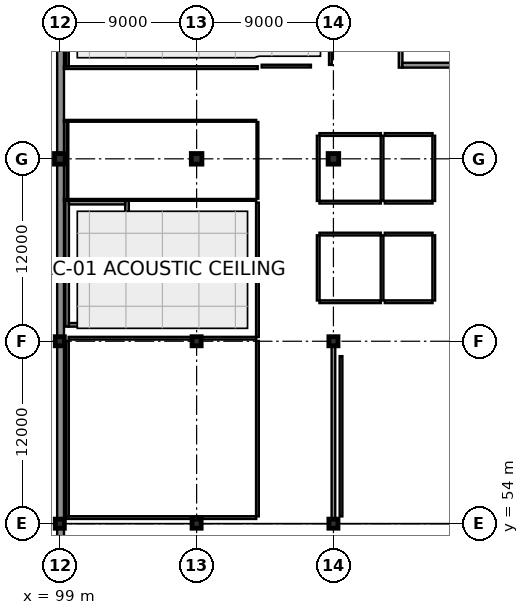
"""IFC4 building model, lengths in metres.
Left out: names, types, materials, properties, quantities, classifications, styles, units other than length and angle.
Written with IfcOpenShell. Run it as: python <this file> out.ifc"""

import sys

from ifc_helpers import new_model, si_unit, direction, frame, frame_2d, origin, origin_2d, place, context, subcontext, project, spatial, rectangle, extrude, element, fill, save


model = new_model("IFC4")
c1 = context("Model", 3, precision=1e-05, world=origin(), true_north=direction((0.0, 1.0)))
c2 = subcontext(c1, "Body", "Model", "MODEL_VIEW")
j1 = project(units=[si_unit("LENGTHUNIT", "METRE"), si_unit("PLANEANGLEUNIT", "RADIAN")], contexts=[c1])
p1 = place(None, origin())
s1 = spatial("IfcSite", under=j1, at=p1, CompositionType="ELEMENT")
p2 = place(p1, origin())
s2 = spatial("IfcBuilding", under=s1, at=p2, CompositionType="ELEMENT")
p3 = place(p2, frame((0.0, 0.0, -4.5)))
s3 = spatial("IfcBuildingStorey", under=s2, at=p3, CompositionType="ELEMENT", Elevation=-4.5)
for number, where, z_axis, x_axis in (
    (1, (99.0, 54.0, 0.0), (0.0, 0.0, 1.0), (1.0, 0.0, 0.0)),
    (2, (99.0, 66.0, 0.0), (0.0, 0.0, 1.0), (1.0, 0.0, 0.0)),
):
    element("IfcColumn", number, at=place(p3, frame(where, z_axis=z_axis, x_axis=x_axis)), inside=s3, PredefinedType="COLUMN", context=c2, shape_type="SweptSolid", body=[
        extrude(rectangle(XDim=0.6, YDim=0.6, at=origin_2d()), origin(), (0.0, 0.0, 1.0), 4.5),
    ])
p4 = place(p3, frame((99.0, 78.0, 0.0), z_axis=(0.0, 0.0, 1.0), x_axis=(1.0, 0.0, 0.0)))
e3 = element("IfcColumn", 3, at=p4, inside=s3, PredefinedType="COLUMN", context=c2, shape_type="SweptSolid", body=[
    extrude(rectangle(XDim=0.7, YDim=0.7, at=origin_2d()), origin(), (0.0, 0.0, 1.0), 4.5),
])
for number, where, z_axis, x_axis in (
    (4, (108.0, 54.0, 0.0), (0.0, 0.0, 1.0), (1.0, 0.0, 0.0)),
    (5, (108.0, 66.0, 0.0), (0.0, 0.0, 1.0), (1.0, 0.0, 0.0)),
):
    element("IfcColumn", number, at=place(p3, frame(where, z_axis=z_axis, x_axis=x_axis)), inside=s3, PredefinedType="COLUMN", context=c2, shape_type="SweptSolid", body=[
        extrude(rectangle(XDim=0.6, YDim=0.6, at=origin_2d()), origin(), (0.0, 0.0, 1.0), 4.5),
    ])
p5 = place(p3, frame((108.0, 78.0, 0.0), z_axis=(0.0, 0.0, 1.0), x_axis=(1.0, 0.0, 0.0)))
e6 = element("IfcColumn", 6, at=p5, inside=s3, PredefinedType="COLUMN", context=c2, shape_type="SweptSolid", body=[
    extrude(rectangle(XDim=0.7, YDim=0.7, at=origin_2d()), origin(), (0.0, 0.0, 1.0), 4.5),
])
for number, where, z_axis, x_axis in (
    (7, (117.0, 54.0, 0.0), (0.0, 0.0, 1.0), (1.0, 0.0, 0.0)),
    (8, (117.0, 66.0, 0.0), (0.0, 0.0, 1.0), (1.0, 0.0, 0.0)),
):
    element("IfcColumn", number, at=place(p3, frame(where, z_axis=z_axis, x_axis=x_axis)), inside=s3, PredefinedType="COLUMN", context=c2, shape_type="SweptSolid", body=[
        extrude(rectangle(XDim=0.6, YDim=0.6, at=origin_2d()), origin(), (0.0, 0.0, 1.0), 4.5),
    ])
p6 = place(p3, frame((117.0, 78.0, 0.0), z_axis=(0.0, 0.0, 1.0), x_axis=(1.0, 0.0, 0.0)))
e9 = element("IfcColumn", 9, at=p6, inside=s3, PredefinedType="COLUMN", context=c2, shape_type="SweptSolid", body=[
    extrude(rectangle(XDim=0.7, YDim=0.7, at=origin_2d()), origin(), (0.0, 0.0, 1.0), 4.5),
])
p7 = place(p3, frame((99.05, 95.654, 0.0), z_axis=(0.0, 0.0, 1.0), x_axis=(0.0, -1.0, 0.0)))
e10 = element("IfcWall", 10, at=p7, inside=s3, PredefinedType="USERDEFINED", context=c2, shape_type="SweptSolid", body=[
    extrude(rectangle(XDim=17.308, YDim=0.45, at=frame_2d((8.654, 0.0))), origin(), (0.0, 0.0, 1.0), 4.32),
])
p8 = place(p3, frame((99.05, 77.654, 0.0), z_axis=(0.0, 0.0, 1.0), x_axis=(0.0, -1.0, 0.0)))
e11 = element("IfcWall", 11, at=p8, inside=s3, PredefinedType="USERDEFINED", context=c2, shape_type="SweptSolid", body=[
    extrude(rectangle(XDim=11.358, YDim=0.45, at=frame_2d((5.679, 0.0))), origin(), (0.0, 0.0, 1.0), 4.32),
])
p9 = place(p3, frame((99.05, 65.704, 0.0), z_axis=(0.0, 0.0, 1.0), x_axis=(0.0, -1.0, 0.0)))
e12 = element("IfcWall", 12, at=p9, inside=s3, PredefinedType="USERDEFINED", context=c2, shape_type="SweptSolid", body=[
    extrude(rectangle(XDim=11.408, YDim=0.45, at=frame_2d((5.704, 0.0))), origin(), (0.0, 0.0, 1.0), 4.32),
])
p10 = place(p3, frame((99.05, 53.704, 0.0), z_axis=(0.0, 0.0, 1.0), x_axis=(0.0, -1.0, 0.0)))
e13 = element("IfcWall", 13, at=p10, inside=s3, PredefinedType="USERDEFINED", context=c2, shape_type="SweptSolid", body=[
    extrude(rectangle(XDim=11.358, YDim=0.45, at=frame_2d((5.679, 0.0))), origin(), (0.0, 0.0, 1.0), 4.32),
])
for number, where, z_axis, x_axis in (
    (14, (99.48, 66.96, 0.0), (0.0, 0.0, 1.0), (0.0, 1.0, 0.0)),
    (15, (103.42, 66.96, 0.0), (0.0, 0.0, 1.0), (0.0, 1.0, 0.0)),
):
    element("IfcWall", number, at=place(p3, frame(where, z_axis=z_axis, x_axis=x_axis)), inside=s3, PredefinedType="SHEAR", context=c2, shape_type="SweptSolid", body=[
        extrude(rectangle(XDim=8.28, YDim=0.24, at=frame_2d((4.14, 0.0))), origin(), (0.0, 0.0, 1.0), 4.31),
    ])
for number, where, z_axis, x_axis in (
    (16, (99.6, 67.08, 0.0), (0.0, 0.0, 1.0), (1.0, 0.0, 0.0)),
    (17, (99.6, 75.12, 0.0), (0.0, 0.0, 1.0), (1.0, 0.0, 0.0)),
):
    element("IfcWall", number, at=place(p3, frame(where, z_axis=z_axis, x_axis=x_axis)), inside=s3, PredefinedType="SHEAR", context=c2, shape_type="SweptSolid", body=[
        extrude(rectangle(XDim=3.7, YDim=0.24, at=frame_2d((1.85, 0.0))), origin(), (0.0, 0.0, 1.0), 4.31),
    ])
p11 = place(p3, frame((121.42, 84.0, 0.0), z_axis=(0.0, 0.0, 1.0), x_axis=(0.0, 1.0, 0.0)))
e18 = element("IfcWall", 18, at=p11, inside=s3, PredefinedType="SHEAR", context=c2, shape_type="SweptSolid", body=[
    extrude(rectangle(XDim=2.76, YDim=0.24, at=frame_2d((1.38, 0.0))), origin(), (0.0, 0.0, 1.0), 4.16),
])
p12 = place(p3, frame((121.54, 84.16, 0.0), z_axis=(0.0, 0.0, 1.0), x_axis=(1.0, 0.0, 0.0)))
e19 = element("IfcWall", 19, at=p12, inside=s3, PredefinedType="SHEAR", context=c2, shape_type="SweptSolid", body=[
    extrude(rectangle(XDim=3.9, YDim=0.32, at=frame_2d((1.95, 0.0))), origin(), (0.0, 0.0, 1.0), 4.16),
])
p13 = place(p12, frame((1.225, 0.0, 0.0)))
e20 = element("IfcOpeningElement", 20, at=p13, cuts=e19, PredefinedType="OPENING", context=c2, shape_type="SweptSolid", body=[
    extrude(rectangle(XDim=1.45, YDim=2.2, at=frame_2d((0.725, 1.1))), frame((0.0, 0.175, 0.0), z_axis=(0.0, -1.0, 0.0), x_axis=(1.0, 0.0, 0.0)), (0.0, 0.0, 1.0), 0.35),
])
p14 = place(p3, frame((117.0, 54.296, 0.0), z_axis=(0.0, 0.0, 1.0), x_axis=(0.0, 1.0, 0.0)))
e21 = element("IfcWall", 21, at=p14, inside=s3, PredefinedType="SHEAR", context=c2, shape_type="SweptSolid", body=[
    extrude(rectangle(XDim=11.408, YDim=0.24, at=frame_2d((5.704, 0.0))), origin(), (0.0, 0.0, 1.0), 3.825),
])
p15 = place(p3, frame((115.52, 84.1, 0.0), z_axis=(0.0, 0.0, 1.0), x_axis=(-1.0, 0.0, 0.0)))
e22 = element("IfcWall", 22, at=p15, inside=s3, PredefinedType="PARTITIONING", context=c2, shape_type="SweptSolid", body=[
    extrude(rectangle(XDim=3.24, YDim=0.18, at=frame_2d((1.62, 0.0))), origin(), (0.0, 0.0, 1.0), 4.14),
])
p16 = place(p3, frame((112.02, 84.0, 0.0), z_axis=(0.0, 0.0, 1.0), x_axis=(-1.0, 0.0, 0.0)))
e23 = element("IfcWall", 23, at=p16, inside=s3, PredefinedType="PARTITIONING", context=c2, shape_type="SweptSolid", body=[
    extrude(rectangle(XDim=12.75, YDim=0.18, at=frame_2d((6.375, 0.0))), origin(), (0.0, 0.0, 1.0), 4.14),
])
p17 = place(p3, frame((99.5, 84.08, 0.0), z_axis=(0.0, 0.0, 1.0), x_axis=(0.0, 1.0, 0.0)))
e24 = element("IfcWall", 24, at=p17, inside=s3, PredefinedType="PARTITIONING", context=c2, shape_type="SweptSolid", body=[
    extrude(rectangle(XDim=11.74, YDim=0.18, at=frame_2d((5.87, 0.0))), origin(), (0.0, 0.0, 1.0), 3.715),
])
p18 = place(p3, frame((116.8, 95.82, 0.0), z_axis=(0.0, 0.0, 1.0), x_axis=(0.0, -1.0, 0.0)))
e25 = element("IfcWall", 25, at=p18, inside=s3, PredefinedType="PARTITIONING", context=c2, shape_type="SweptSolid", body=[
    extrude(rectangle(XDim=11.64, YDim=0.18, at=frame_2d((5.82, 0.0))), origin(), (0.0, 0.0, 1.0), 3.405),
])
p19 = place(p3, frame((99.5, 75.38, 0.0), z_axis=(0.0, 0.0, 1.0), x_axis=(0.0, 1.0, 0.0)))
e26 = element("IfcWall", 26, at=p19, inside=s3, PredefinedType="PARTITIONING", context=c2, shape_type="SweptSolid", body=[
    extrude(rectangle(XDim=5.04, YDim=0.12, at=frame_2d((2.52, 0.0))), origin(), (0.0, 0.0, 1.0), 3.715),
])
p20 = place(p3, frame((99.27, 80.5, 0.0), z_axis=(0.0, 0.0, 1.0), x_axis=(1.0, 0.0, 0.0)))
e27 = element("IfcWall", 27, at=p20, inside=s3, PredefinedType="PARTITIONING", context=c2, shape_type="SweptSolid", body=[
    extrude(rectangle(XDim=12.65, YDim=0.12, at=frame_2d((6.325, 0.0))), origin(), (0.0, 0.0, 1.0), 4.14),
])
p21 = place(p3, frame((112.0, 80.42, 0.0), z_axis=(0.0, 0.0, 1.0), x_axis=(0.0, -1.0, 0.0)))
e28 = element("IfcWall", 28, at=p21, inside=s3, PredefinedType="PARTITIONING", context=c2, shape_type="SweptSolid", body=[
    extrude(rectangle(XDim=5.04, YDim=0.12, at=frame_2d((2.52, 0.0))), origin(), (0.0, 0.0, 1.0), 4.14),
])
p22 = place(p21, frame((2.07, 0.0, 0.0)))
e29 = element("IfcOpeningElement", 29, at=p22, cuts=e28, PredefinedType="OPENING", context=c2, shape_type="SweptSolid", body=[
    extrude(rectangle(XDim=0.9, YDim=2.1, at=frame_2d((0.45, 1.05))), frame((0.0, 0.075, 0.0), z_axis=(0.0, -1.0, 0.0), x_axis=(1.0, 0.0, 0.0)), (0.0, 0.0, 1.0), 0.15),
])
p23 = place(p3, frame((111.92, 75.3, 0.0), z_axis=(0.0, 0.0, 1.0), x_axis=(-1.0, 0.0, 0.0)))
e30 = element("IfcWall", 30, at=p23, inside=s3, PredefinedType="PARTITIONING", context=c2, shape_type="SweptSolid", body=[
    extrude(rectangle(XDim=12.65, YDim=0.12, at=frame_2d((6.325, 0.0))), origin(), (0.0, 0.0, 1.0), 4.14),
])
p24 = place(p3, frame((112.0, 75.12, 0.0), z_axis=(0.0, 0.0, 1.0), x_axis=(0.0, -1.0, 0.0)))
e31 = element("IfcWall", 31, at=p24, inside=s3, PredefinedType="PARTITIONING", context=c2, shape_type="SweptSolid", body=[
    extrude(rectangle(XDim=8.84, YDim=0.18, at=frame_2d((4.42, 0.0))), origin(), (0.0, 0.0, 1.0), 4.14),
])
p25 = place(p24, frame((3.945, 0.0, 0.0)))
e32 = element("IfcOpeningElement", 32, at=p25, cuts=e31, PredefinedType="OPENING", context=c2, shape_type="SweptSolid", body=[
    extrude(rectangle(XDim=0.95, YDim=2.1, at=frame_2d((0.475, 1.05))), frame((0.0, 0.105, 0.0), z_axis=(0.0, -1.0, 0.0), x_axis=(1.0, 0.0, 0.0)), (0.0, 0.0, 1.0), 0.21),
])
p26 = place(p24, frame((6.79, 0.0, 1.05)))
e33 = element("IfcOpeningElement", 33, at=p26, cuts=e31, PredefinedType="OPENING", context=c2, shape_type="SweptSolid", body=[
    extrude(rectangle(XDim=1.2, YDim=1.0, at=frame_2d((0.6, 0.5))), frame((0.0, 0.105, 0.0), z_axis=(0.0, -1.0, 0.0), x_axis=(1.0, 0.0, 0.0)), (0.0, 0.0, 1.0), 0.21),
])
p27 = place(p3, frame((111.92, 66.2, 0.0), z_axis=(0.0, 0.0, 1.0), x_axis=(-1.0, 0.0, 0.0)))
e34 = element("IfcWall", 34, at=p27, inside=s3, PredefinedType="PARTITIONING", context=c2, shape_type="SweptSolid", body=[
    extrude(rectangle(XDim=12.34, YDim=0.18, at=frame_2d((6.17, 0.0))), origin(), (0.0, 0.0, 1.0), 3.595),
])
p28 = place(p3, frame((120.12, 68.6, 0.0), z_axis=(0.0, 0.0, 1.0), x_axis=(-1.0, 0.0, 0.0)))
e35 = element("IfcWall", 35, at=p28, inside=s3, PredefinedType="PARTITIONING", context=c2, shape_type="SweptSolid", body=[
    extrude(rectangle(XDim=4.04, YDim=0.18, at=frame_2d((2.02, 0.0))), origin(), (0.0, 0.0, 1.0), 4.14),
])
p29 = place(p3, frame((116.0, 68.68, 0.0), z_axis=(0.0, 0.0, 1.0), x_axis=(0.0, 1.0, 0.0)))
e36 = element("IfcWall", 36, at=p29, inside=s3, PredefinedType="PARTITIONING", context=c2, shape_type="SweptSolid", body=[
    extrude(rectangle(XDim=4.29, YDim=0.18, at=frame_2d((2.145, 0.0))), origin(), (0.0, 0.0, 1.0), 4.14),
])
p30 = place(p29, frame((1.42, 0.0, 0.0)))
e37 = element("IfcOpeningElement", 37, at=p30, cuts=e36, PredefinedType="OPENING", context=c2, shape_type="SweptSolid", body=[
    extrude(rectangle(XDim=1.45, YDim=2.3, at=frame_2d((0.725, 1.15))), frame((0.0, 0.105, 0.0), z_axis=(0.0, -1.0, 0.0), x_axis=(1.0, 0.0, 0.0)), (0.0, 0.0, 1.0), 0.21),
])
p31 = place(p3, frame((116.08, 73.05, 0.0), z_axis=(0.0, 0.0, 1.0), x_axis=(1.0, 0.0, 0.0)))
e38 = element("IfcWall", 38, at=p31, inside=s3, PredefinedType="PARTITIONING", context=c2, shape_type="SweptSolid", body=[
    extrude(rectangle(XDim=4.04, YDim=0.18, at=frame_2d((2.02, 0.0))), origin(), (0.0, 0.0, 1.0), 4.14),
])
p32 = place(p3, frame((120.2, 72.97, 0.0), z_axis=(0.0, 0.0, 1.0), x_axis=(0.0, -1.0, 0.0)))
e39 = element("IfcWall", 39, at=p32, inside=s3, PredefinedType="PARTITIONING", context=c2, shape_type="SweptSolid", body=[
    extrude(rectangle(XDim=4.29, YDim=0.18, at=frame_2d((2.145, 0.0))), origin(), (0.0, 0.0, 1.0), 3.835),
])
p33 = place(p3, frame((116.0, 75.23, 0.0), z_axis=(0.0, 0.0, 1.0), x_axis=(0.0, 1.0, 0.0)))
e40 = element("IfcWall", 40, at=p33, inside=s3, PredefinedType="PARTITIONING", context=c2, shape_type="SweptSolid", body=[
    extrude(rectangle(XDim=4.29, YDim=0.18, at=frame_2d((2.145, 0.0))), origin(), (0.0, 0.0, 1.0), 4.14),
])
p34 = place(p33, frame((1.227, 0.0, 0.0)))
e41 = element("IfcOpeningElement", 41, at=p34, cuts=e40, PredefinedType="OPENING", context=c2, shape_type="SweptSolid", body=[
    extrude(rectangle(XDim=1.15, YDim=2.15, at=frame_2d((0.575, 1.075))), frame((0.0, 0.105, 0.0), z_axis=(0.0, -1.0, 0.0), x_axis=(1.0, 0.0, 0.0)), (0.0, 0.0, 1.0), 0.21),
])
p35 = place(p3, frame((116.08, 79.6, 0.0), z_axis=(0.0, 0.0, 1.0), x_axis=(1.0, 0.0, 0.0)))
e42 = element("IfcWall", 42, at=p35, inside=s3, PredefinedType="PARTITIONING", context=c2, shape_type="SweptSolid", body=[
    extrude(rectangle(XDim=4.04, YDim=0.18, at=frame_2d((2.02, 0.0))), origin(), (0.0, 0.0, 1.0), 4.14),
])
p36 = place(p3, frame((120.2, 79.52, 0.0), z_axis=(0.0, 0.0, 1.0), x_axis=(0.0, -1.0, 0.0)))
e43 = element("IfcWall", 43, at=p36, inside=s3, PredefinedType="PARTITIONING", context=c2, shape_type="SweptSolid", body=[
    extrude(rectangle(XDim=4.29, YDim=0.18, at=frame_2d((2.145, 0.0))), origin(), (0.0, 0.0, 1.0), 4.14),
])
p37 = place(p3, frame((120.12, 75.15, 0.0), z_axis=(0.0, 0.0, 1.0), x_axis=(-1.0, 0.0, 0.0)))
e44 = element("IfcWall", 44, at=p37, inside=s3, PredefinedType="PARTITIONING", context=c2, shape_type="SweptSolid", body=[
    extrude(rectangle(XDim=4.04, YDim=0.18, at=frame_2d((2.02, 0.0))), origin(), (0.0, 0.0, 1.0), 4.14),
])
p38 = place(p3, frame((120.38, 79.6, 0.0), z_axis=(0.0, 0.0, 1.0), x_axis=(1.0, 0.0, 0.0)))
e45 = element("IfcWall", 45, at=p38, inside=s3, PredefinedType="PARTITIONING", context=c2, shape_type="SweptSolid", body=[
    extrude(rectangle(XDim=3.14, YDim=0.18, at=frame_2d((1.57, 0.0))), origin(), (0.0, 0.0, 1.0), 4.14),
])
p39 = place(p3, frame((123.6, 79.52, 0.0), z_axis=(0.0, 0.0, 1.0), x_axis=(0.0, -1.0, 0.0)))
e46 = element("IfcWall", 46, at=p39, inside=s3, PredefinedType="PARTITIONING", context=c2, shape_type="SweptSolid", body=[
    extrude(rectangle(XDim=4.29, YDim=0.18, at=frame_2d((2.145, 0.0))), origin(), (0.0, 0.0, 1.0), 4.14),
])
p40 = place(p3, frame((123.52, 75.15, 0.0), z_axis=(0.0, 0.0, 1.0), x_axis=(-1.0, 0.0, 0.0)))
e47 = element("IfcWall", 47, at=p40, inside=s3, PredefinedType="PARTITIONING", context=c2, shape_type="SweptSolid", body=[
    extrude(rectangle(XDim=3.14, YDim=0.18, at=frame_2d((1.57, 0.0))), origin(), (0.0, 0.0, 1.0), 4.14),
])
p41 = place(p40, frame((1.095, 0.0, 0.0)))
e48 = element("IfcOpeningElement", 48, at=p41, cuts=e47, PredefinedType="OPENING", context=c2, shape_type="SweptSolid", body=[
    extrude(rectangle(XDim=0.95, YDim=2.1, at=frame_2d((0.475, 1.05))), frame((0.0, 0.105, 0.0), z_axis=(0.0, -1.0, 0.0), x_axis=(1.0, 0.0, 0.0)), (0.0, 0.0, 1.0), 0.21),
])
p42 = place(p3, frame((123.6, 72.97, 0.0), z_axis=(0.0, 0.0, 1.0), x_axis=(0.0, -1.0, 0.0)))
e49 = element("IfcWall", 49, at=p42, inside=s3, PredefinedType="PARTITIONING", context=c2, shape_type="SweptSolid", body=[
    extrude(rectangle(XDim=4.29, YDim=0.18, at=frame_2d((2.145, 0.0))), origin(), (0.0, 0.0, 1.0), 4.14),
])
p43 = place(p3, frame((123.52, 68.6, 0.0), z_axis=(0.0, 0.0, 1.0), x_axis=(-1.0, 0.0, 0.0)))
e50 = element("IfcWall", 50, at=p43, inside=s3, PredefinedType="PARTITIONING", context=c2, shape_type="SweptSolid", body=[
    extrude(rectangle(XDim=3.14, YDim=0.18, at=frame_2d((1.57, 0.0))), origin(), (0.0, 0.0, 1.0), 4.14),
])
p44 = place(p43, frame((0.845, 0.0, 0.0)))
e51 = element("IfcOpeningElement", 51, at=p44, cuts=e50, PredefinedType="OPENING", context=c2, shape_type="SweptSolid", body=[
    extrude(rectangle(XDim=1.45, YDim=2.3, at=frame_2d((0.725, 1.15))), frame((0.0, 0.105, 0.0), z_axis=(0.0, -1.0, 0.0), x_axis=(1.0, 0.0, 0.0)), (0.0, 0.0, 1.0), 0.21),
])
p45 = place(p3, frame((120.38, 73.05, 0.0), z_axis=(0.0, 0.0, 1.0), x_axis=(1.0, 0.0, 0.0)))
e52 = element("IfcWall", 52, at=p45, inside=s3, PredefinedType="PARTITIONING", context=c2, shape_type="SweptSolid", body=[
    extrude(rectangle(XDim=3.14, YDim=0.18, at=frame_2d((1.57, 0.0))), origin(), (0.0, 0.0, 1.0), 4.14),
])
p46 = place(p3, frame((112.0, 66.02, 0.0), z_axis=(0.0, 0.0, 1.0), x_axis=(0.0, -1.0, 0.0)))
e53 = element("IfcWall", 53, at=p46, inside=s3, PredefinedType="PARTITIONING", context=c2, shape_type="SweptSolid", body=[
    extrude(rectangle(XDim=11.54, YDim=0.18, at=frame_2d((5.77, 0.0))), origin(), (0.0, 0.0, 1.0), 4.14),
])
p47 = place(p46, frame((5.045, 0.0, 0.0)))
e54 = element("IfcOpeningElement", 54, at=p47, cuts=e53, PredefinedType="OPENING", context=c2, shape_type="SweptSolid", body=[
    extrude(rectangle(XDim=1.45, YDim=2.3, at=frame_2d((0.725, 1.15))), frame((0.0, 0.105, 0.0), z_axis=(0.0, -1.0, 0.0), x_axis=(1.0, 0.0, 0.0)), (0.0, 0.0, 1.0), 0.21),
])
p48 = place(p46, frame((9.49, 0.0, 1.05)))
e55 = element("IfcOpeningElement", 55, at=p48, cuts=e53, PredefinedType="OPENING", context=c2, shape_type="SweptSolid", body=[
    extrude(rectangle(XDim=1.2, YDim=1.0, at=frame_2d((0.6, 0.5))), frame((0.0, 0.105, 0.0), z_axis=(0.0, -1.0, 0.0), x_axis=(1.0, 0.0, 0.0)), (0.0, 0.0, 1.0), 0.21),
])
p49 = place(p3, frame((111.92, 54.4, 0.0), z_axis=(0.0, 0.0, 1.0), x_axis=(-1.0, 0.0, 0.0)))
e56 = element("IfcWall", 56, at=p49, inside=s3, PredefinedType="PARTITIONING", context=c2, shape_type="SweptSolid", body=[
    extrude(rectangle(XDim=12.574, YDim=0.18, at=frame_2d((6.287, 0.0))), origin(), (0.0, 0.0, 1.0), 4.14),
])
p50 = place(p3, frame((99.5, 54.48, 0.0), z_axis=(0.0, 0.0, 1.0), x_axis=(0.0, 1.0, 0.0)))
e57 = element("IfcWall", 57, at=p50, inside=s3, PredefinedType="PARTITIONING", context=c2, shape_type="SweptSolid", body=[
    extrude(rectangle(XDim=11.54, YDim=0.18, at=frame_2d((5.77, 0.0))), origin(), (0.0, 0.0, 1.0), 3.835),
])
p51 = place(p3, frame((117.5, 54.48, 0.0), z_axis=(0.0, 0.0, 1.0), x_axis=(0.0, 1.0, 0.0)))
e58 = element("IfcWall", 58, at=p51, inside=s3, PredefinedType="PARTITIONING", context=c2, shape_type="SweptSolid", body=[
    extrude(rectangle(XDim=10.54, YDim=0.18, at=frame_2d((5.27, 0.0))), origin(), (0.0, 0.0, 1.0), 4.14),
])
p52 = place(p13, origin())
e59 = element("IfcDoor", 59, at=p52, inside=s3, OperationType="DOUBLE_DOOR_SINGLE_SWING", PredefinedType="DOOR", context=c2, shape_type="SweptSolid", body=[
    extrude(rectangle(XDim=1.45, YDim=2.2, at=frame_2d((0.725, 1.1))), frame((0.0, 0.025, 0.0), z_axis=(0.0, -1.0, 0.0), x_axis=(1.0, 0.0, 0.0)), (0.0, 0.0, 1.0), 0.05),
])
fill(e20, e59)
p53 = place(p22, origin())
e60 = element("IfcDoor", 60, at=p53, inside=s3, OperationType="SINGLE_SWING_RIGHT", PredefinedType="DOOR", context=c2, shape_type="SweptSolid", body=[
    extrude(rectangle(XDim=0.9, YDim=2.1, at=frame_2d((0.45, 1.05))), frame((0.0, 0.025, 0.0), z_axis=(0.0, -1.0, 0.0), x_axis=(1.0, 0.0, 0.0)), (0.0, 0.0, 1.0), 0.05),
])
fill(e29, e60)
p54 = place(p25, frame((0.95, 0.0, 0.0), z_axis=(0.0, 0.0, 1.0), x_axis=(-1.0, 0.0, 0.0)))
e61 = element("IfcDoor", 61, at=p54, inside=s3, OperationType="SINGLE_SWING_LEFT", PredefinedType="DOOR", context=c2, shape_type="SweptSolid", body=[
    extrude(rectangle(XDim=0.95, YDim=2.1, at=frame_2d((0.475, 1.05))), frame((0.0, 0.025, 0.0), z_axis=(0.0, -1.0, 0.0), x_axis=(1.0, 0.0, 0.0)), (0.0, 0.0, 1.0), 0.05),
])
fill(e32, e61)
p55 = place(p26, origin())
e62 = element("IfcWindow", 62, at=p55, inside=s3, PartitioningType="SINGLE_PANEL", PredefinedType="WINDOW", context=c2, shape_type="SweptSolid", body=[
    extrude(rectangle(XDim=1.2, YDim=1.0, at=frame_2d((0.6, 0.5))), frame((0.0, 0.03, 0.0), z_axis=(0.0, -1.0, 0.0), x_axis=(1.0, 0.0, 0.0)), (0.0, 0.0, 1.0), 0.06),
])
fill(e33, e62)
p56 = place(p30, origin())
e63 = element("IfcDoor", 63, at=p56, inside=s3, OperationType="DOUBLE_DOOR_SINGLE_SWING", PredefinedType="DOOR", context=c2, shape_type="SweptSolid", body=[
    extrude(rectangle(XDim=1.45, YDim=2.3, at=frame_2d((0.725, 1.15))), frame((0.0, 0.025, 0.0), z_axis=(0.0, -1.0, 0.0), x_axis=(1.0, 0.0, 0.0)), (0.0, 0.0, 1.0), 0.05),
])
fill(e37, e63)
p57 = place(p34, frame((1.15, 0.0, 0.0), z_axis=(0.0, 0.0, 1.0), x_axis=(-1.0, 0.0, 0.0)))
e64 = element("IfcDoor", 64, at=p57, inside=s3, OperationType="SINGLE_SWING_RIGHT", PredefinedType="DOOR", context=c2, shape_type="SweptSolid", body=[
    extrude(rectangle(XDim=1.15, YDim=2.15, at=frame_2d((0.575, 1.075))), frame((0.0, 0.025, 0.0), z_axis=(0.0, -1.0, 0.0), x_axis=(1.0, 0.0, 0.0)), (0.0, 0.0, 1.0), 0.05),
])
fill(e41, e64)
p58 = place(p41, origin())
e65 = element("IfcDoor", 65, at=p58, inside=s3, OperationType="SINGLE_SWING_LEFT", PredefinedType="DOOR", context=c2, shape_type="SweptSolid", body=[
    extrude(rectangle(XDim=0.95, YDim=2.1, at=frame_2d((0.475, 1.05))), frame((0.0, 0.025, 0.0), z_axis=(0.0, -1.0, 0.0), x_axis=(1.0, 0.0, 0.0)), (0.0, 0.0, 1.0), 0.05),
])
fill(e48, e65)
p59 = place(p44, frame((1.45, 0.0, 0.0), z_axis=(0.0, 0.0, 1.0), x_axis=(-1.0, 0.0, 0.0)))
e66 = element("IfcDoor", 66, at=p59, inside=s3, OperationType="DOUBLE_DOOR_SINGLE_SWING", PredefinedType="DOOR", context=c2, shape_type="SweptSolid", body=[
    extrude(rectangle(XDim=1.45, YDim=2.3, at=frame_2d((0.725, 1.15))), frame((0.0, 0.025, 0.0), z_axis=(0.0, -1.0, 0.0), x_axis=(1.0, 0.0, 0.0)), (0.0, 0.0, 1.0), 0.05),
])
fill(e51, e66)
p60 = place(p47, origin())
e67 = element("IfcDoor", 67, at=p60, inside=s3, OperationType="DOUBLE_DOOR_SINGLE_SWING", PredefinedType="DOOR", context=c2, shape_type="SweptSolid", body=[
    extrude(rectangle(XDim=1.45, YDim=2.3, at=frame_2d((0.725, 1.15))), frame((0.0, 0.025, 0.0), z_axis=(0.0, -1.0, 0.0), x_axis=(1.0, 0.0, 0.0)), (0.0, 0.0, 1.0), 0.05),
])
fill(e54, e67)
p61 = place(p48, origin())
e68 = element("IfcWindow", 68, at=p61, inside=s3, PartitioningType="SINGLE_PANEL", PredefinedType="WINDOW", context=c2, shape_type="SweptSolid", body=[
    extrude(rectangle(XDim=1.2, YDim=1.0, at=frame_2d((0.6, 0.5))), frame((0.0, 0.03, 0.0), z_axis=(0.0, -1.0, 0.0), x_axis=(1.0, 0.0, 0.0)), (0.0, 0.0, 1.0), 0.06),
])
fill(e55, e68)
save(model, sys.argv[1])
